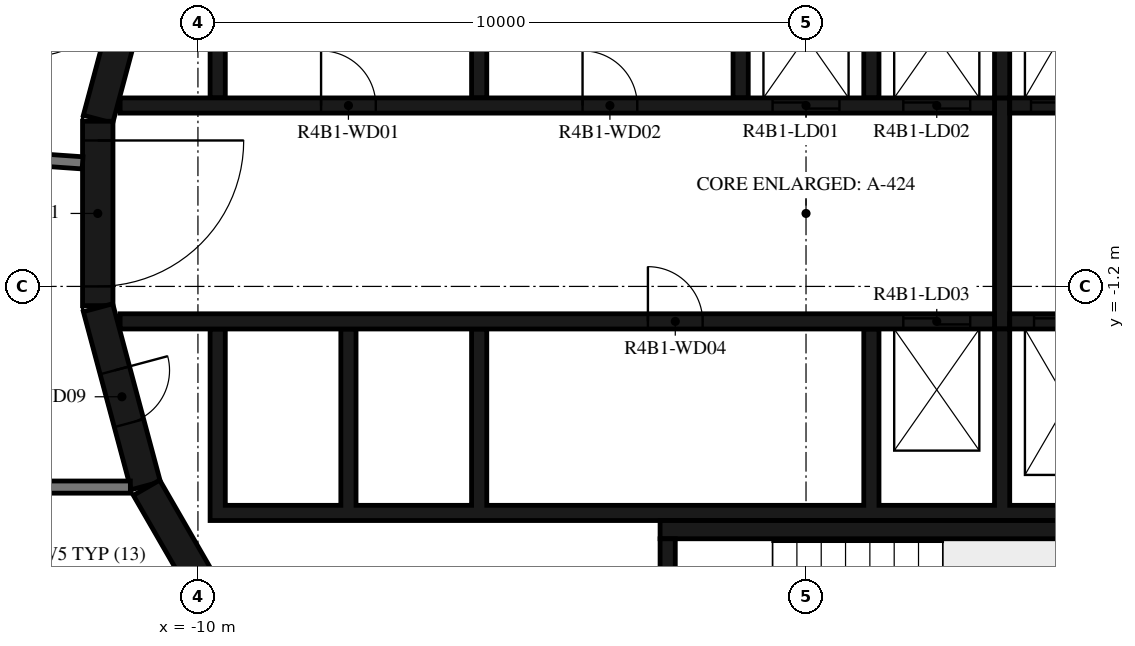
"""IFC4 building model, lengths in metres.
Left out: names, types, materials, properties, quantities, classifications, styles, units other than length and angle.
Written with IfcOpenShell. Run it as: python <this file> out.ifc"""

import sys

from ifc_helpers import new_model, si_unit, direction, frame, frame_2d, origin, place, context, subcontext, project, spatial, polyline, rectangle, outline, extrude, element, fill, save


model = new_model("IFC4")
c1 = context("Model", 3, precision=1e-05, world=origin(), true_north=direction((0.0, 1.0)))
c2 = subcontext(c1, "Body", "Model", "MODEL_VIEW")
j1 = project(units=[si_unit("LENGTHUNIT", "METRE"), si_unit("PLANEANGLEUNIT", "RADIAN")], contexts=[c1])
p1 = place(None, origin())
s1 = spatial("IfcSite", under=j1, at=p1, CompositionType="ELEMENT")
p2 = place(p1, origin())
s2 = spatial("IfcBuilding", under=s1, at=p2, CompositionType="ELEMENT")
p3 = place(p2, frame((0.0, 0.0, 162.2)))
s3 = spatial("IfcBuildingStorey", under=s2, at=p3, CompositionType="ELEMENT", Elevation=162.2)
p4 = place(p3, frame((-10.858, 4.479, 0.0), z_axis=(0.0, 0.0, 1.0), x_axis=(-0.258734743916, -0.965948410781, 0.0)))
e1 = element("IfcWall", 1, at=p4, inside=s3, PredefinedType="SHEAR", context=c2, shape_type="SweptSolid", body=[
    extrude(rectangle(XDim=3.033, YDim=0.5, at=frame_2d((1.516, 0.0))), origin(), (0.0, 0.0, 1.0), 3.12),
])
p5 = place(p3, frame((-11.647, 1.516, 0.0), z_axis=(0.0, 0.0, 1.0), x_axis=(0.0, -1.0, 0.0)))
e2 = element("IfcWall", 2, at=p5, inside=s3, PredefinedType="SHEAR", context=c2, shape_type="SweptSolid", body=[
    extrude(rectangle(XDim=3.033, YDim=0.5, at=frame_2d((1.516, 0.0))), origin(), (0.0, 0.0, 1.0), 3.12),
])
p6 = place(p5, frame((0.316, 0.0, 0.0)))
e3 = element("IfcOpeningElement", 3, at=p6, cuts=e2, PredefinedType="OPENING", context=c2, shape_type="SweptSolid", body=[
    extrude(rectangle(XDim=2.4, YDim=2.1, at=frame_2d((1.2, 1.05))), frame((0.0, 0.26, 0.0), z_axis=(0.0, -1.0, 0.0), x_axis=(1.0, 0.0, 0.0)), (0.0, 0.0, 1.0), 0.52),
])
p7 = place(p3, frame((-11.643, -1.55, 0.0), z_axis=(0.0, 0.0, 1.0), x_axis=(0.258734743916, -0.965948410781, 0.0)))
e4 = element("IfcWall", 4, at=p7, inside=s3, PredefinedType="SHEAR", context=c2, shape_type="SweptSolid", body=[
    extrude(rectangle(XDim=3.033, YDim=0.5, at=frame_2d((1.516, 0.0))), origin(), (0.0, 0.0, 1.0), 3.12),
])
p8 = place(p7, frame((1.066, 0.0, 0.0)))
e5 = element("IfcOpeningElement", 5, at=p8, cuts=e4, PredefinedType="OPENING", context=c2, shape_type="SweptSolid", body=[
    extrude(rectangle(XDim=0.9, YDim=2.1, at=frame_2d((0.45, 1.05))), frame((0.0, 0.26, 0.0), z_axis=(0.0, -1.0, 0.0), x_axis=(1.0, 0.0, 0.0)), (0.0, 0.0, 1.0), 0.52),
])
p9 = place(p3, frame((-10.845, -4.51, 0.0), z_axis=(0.0, 0.0, 1.0), x_axis=(0.500087131594, -0.865975092491, 0.0)))
e6 = element("IfcWall", 6, at=p9, inside=s3, PredefinedType="SHEAR", context=c2, shape_type="SweptSolid", body=[
    extrude(rectangle(XDim=3.033, YDim=0.5, at=frame_2d((1.516, 0.0))), origin(), (0.0, 0.0, 1.0), 3.12),
])
p10 = place(p3, frame((-2.275, -8.67, 0.0), z_axis=(0.0, 0.0, 1.0), x_axis=(0.0, 1.0, 0.0)))
e7 = element("IfcWall", 7, at=p10, inside=s3, PredefinedType="SHEAR", context=c2, shape_type="SweptSolid", body=[
    extrude(rectangle(XDim=3.32, YDim=0.25, at=frame_2d((1.66, 0.0))), origin(), (0.0, 0.0, 1.0), 3.12),
])
p11 = place(p3, frame((-2.4, -5.2, 0.0), z_axis=(0.0, 0.0, 1.0), x_axis=(1.0, 0.0, 0.0)))
e8 = element("IfcWall", 8, at=p11, inside=s3, PredefinedType="SHEAR", context=c2, shape_type="SweptSolid", body=[
    extrude(rectangle(XDim=7.05, YDim=0.3, at=frame_2d((3.525, 0.0))), origin(), (0.0, 0.0, 1.0), 3.12),
])
p12 = place(p3, origin())
e9 = element("IfcWall", 9, at=p12, inside=s3, PredefinedType="SHEAR", context=c2, shape_type="SweptSolid", body=[
    extrude(outline(polyline([(-9.55, 4.8), (-5.5, 4.8), (-5.5, 1.9), (-5.25, 1.9), (-5.25, 4.8), (-1.2, 4.8), (-1.2, 1.9), (-0.95, 1.9), (-0.95, 4.8), (0.95, 4.8), (0.95, 1.9), (1.2, 1.9), (1.2, 4.8), (3.1, 4.8), (3.1, 1.9), (3.35, 1.9), (3.35, 4.8), (5.25, 4.8), (5.25, 1.9), (5.5, 1.9), (5.5, 4.8), (7.4, 4.8), (7.4, 1.9), (7.65, 1.9), (7.65, 4.8), (9.55, 4.8), (9.55, 1.9), (9.8, 1.9), (9.8, 4.8), (9.8, 5.05), (-9.8, 5.05), (-9.8, 4.8), (-9.8, 1.9), (-9.55, 1.9), (-9.55, 4.8)])), origin(), (0.0, 0.0, 1.0), 3.12),
])
p13 = place(p3, origin())
e10 = element("IfcWall", 10, at=p13, inside=s3, PredefinedType="SHEAR", context=c2, shape_type="SweptSolid", body=[
    extrude(outline(polyline([(9.8, -5.05), (9.8, -4.8), (9.8, -1.9), (9.55, -1.9), (9.55, -4.8), (7.65, -4.8), (7.65, -1.9), (7.4, -1.9), (7.4, -4.8), (5.5, -4.8), (5.5, -1.9), (5.25, -1.9), (5.25, -4.8), (3.35, -4.8), (3.35, -1.9), (3.1, -1.9), (3.1, -4.8), (1.2, -4.8), (1.2, -1.9), (0.95, -1.9), (0.95, -4.8), (-5.25, -4.8), (-5.25, -1.9), (-5.5, -1.9), (-5.5, -4.8), (-7.4, -4.8), (-7.4, -1.9), (-7.65, -1.9), (-7.65, -4.8), (-9.55, -4.8), (-9.55, -1.9), (-9.8, -1.9), (-9.8, -4.8), (-9.8, -5.05), (9.8, -5.05)])), origin(), (0.0, 0.0, 1.0), 3.12),
])
p14 = place(p3, frame((-11.28, 1.775, 0.0), z_axis=(0.0, 0.0, 1.0), x_axis=(1.0, 0.0, 0.0)))
e11 = element("IfcWall", 11, at=p14, inside=s3, PredefinedType="SHEAR", context=c2, shape_type="SweptSolid", body=[
    extrude(rectangle(XDim=14.38, YDim=0.25, at=frame_2d((7.19, 0.0))), origin(), (0.0, 0.0, 1.0), 3.12),
])
p15 = place(p14, frame((10.73, 0.0, 0.0)))
e12 = element("IfcOpeningElement", 12, at=p15, cuts=e11, PredefinedType="OPENING", context=c2, shape_type="SweptSolid", body=[
    extrude(rectangle(XDim=1.1, YDim=2.1, at=frame_2d((0.55, 1.05))), frame((0.0, 0.135, 0.0), z_axis=(0.0, -1.0, 0.0), x_axis=(1.0, 0.0, 0.0)), (0.0, 0.0, 1.0), 0.27),
])
p16 = place(p14, frame((12.88, 0.0, 0.0)))
e13 = element("IfcOpeningElement", 13, at=p16, cuts=e11, PredefinedType="OPENING", context=c2, shape_type="SweptSolid", body=[
    extrude(rectangle(XDim=1.1, YDim=2.1, at=frame_2d((0.55, 1.05))), frame((0.0, 0.135, 0.0), z_axis=(0.0, -1.0, 0.0), x_axis=(1.0, 0.0, 0.0)), (0.0, 0.0, 1.0), 0.27),
])
p17 = place(p14, frame((3.305, 0.0, 0.0)))
e14 = element("IfcOpeningElement", 14, at=p17, cuts=e11, PredefinedType="OPENING", context=c2, shape_type="SweptSolid", body=[
    extrude(rectangle(XDim=0.9, YDim=2.1, at=frame_2d((0.45, 1.05))), frame((0.0, 0.135, 0.0), z_axis=(0.0, -1.0, 0.0), x_axis=(1.0, 0.0, 0.0)), (0.0, 0.0, 1.0), 0.27),
])
p18 = place(p14, frame((7.605, 0.0, 0.0)))
e15 = element("IfcOpeningElement", 15, at=p18, cuts=e11, PredefinedType="OPENING", context=c2, shape_type="SweptSolid", body=[
    extrude(rectangle(XDim=0.9, YDim=2.1, at=frame_2d((0.45, 1.05))), frame((0.0, 0.135, 0.0), z_axis=(0.0, -1.0, 0.0), x_axis=(1.0, 0.0, 0.0)), (0.0, 0.0, 1.0), 0.27),
])
p19 = place(p3, frame((3.35, 1.775, 0.0), z_axis=(0.0, 0.0, 1.0), x_axis=(1.0, 0.0, 0.0)))
e16 = element("IfcWall", 16, at=p19, inside=s3, PredefinedType="SHEAR", context=c2, shape_type="SweptSolid", body=[
    extrude(rectangle(XDim=7.93, YDim=0.25, at=frame_2d((3.965, 0.0))), origin(), (0.0, 0.0, 1.0), 3.12),
])
p20 = place(p19, frame((0.35, 0.0, 0.0)))
e17 = element("IfcOpeningElement", 17, at=p20, cuts=e16, PredefinedType="OPENING", context=c2, shape_type="SweptSolid", body=[
    extrude(rectangle(XDim=1.2, YDim=2.4, at=frame_2d((0.6, 1.2))), frame((0.0, 0.135, 0.0), z_axis=(0.0, -1.0, 0.0), x_axis=(1.0, 0.0, 0.0)), (0.0, 0.0, 1.0), 0.27),
])
p21 = place(p19, frame((2.5, 0.0, 0.0)))
e18 = element("IfcOpeningElement", 18, at=p21, cuts=e16, PredefinedType="OPENING", context=c2, shape_type="SweptSolid", body=[
    extrude(rectangle(XDim=1.2, YDim=2.4, at=frame_2d((0.6, 1.2))), frame((0.0, 0.135, 0.0), z_axis=(0.0, -1.0, 0.0), x_axis=(1.0, 0.0, 0.0)), (0.0, 0.0, 1.0), 0.27),
])
p22 = place(p19, frame((4.8, 0.0, 0.0)))
e19 = element("IfcOpeningElement", 19, at=p22, cuts=e16, PredefinedType="OPENING", context=c2, shape_type="SweptSolid", body=[
    extrude(rectangle(XDim=0.9, YDim=2.1, at=frame_2d((0.45, 1.05))), frame((0.0, 0.135, 0.0), z_axis=(0.0, -1.0, 0.0), x_axis=(1.0, 0.0, 0.0)), (0.0, 0.0, 1.0), 0.27),
])
p23 = place(p3, frame((-11.28, -1.775, 0.0), z_axis=(0.0, 0.0, 1.0), x_axis=(1.0, 0.0, 0.0)))
e20 = element("IfcWall", 20, at=p23, inside=s3, PredefinedType="SHEAR", context=c2, shape_type="SweptSolid", body=[
    extrude(rectangle(XDim=14.38, YDim=0.25, at=frame_2d((7.19, 0.0))), origin(), (0.0, 0.0, 1.0), 3.12),
])
p24 = place(p23, frame((12.88, 0.0, 0.0)))
e21 = element("IfcOpeningElement", 21, at=p24, cuts=e20, PredefinedType="OPENING", context=c2, shape_type="SweptSolid", body=[
    extrude(rectangle(XDim=1.1, YDim=2.1, at=frame_2d((0.55, 1.05))), frame((0.0, 0.135, 0.0), z_axis=(0.0, -1.0, 0.0), x_axis=(1.0, 0.0, 0.0)), (0.0, 0.0, 1.0), 0.27),
])
p25 = place(p23, frame((8.68, 0.0, 0.0)))
e22 = element("IfcOpeningElement", 22, at=p25, cuts=e20, PredefinedType="OPENING", context=c2, shape_type="SweptSolid", body=[
    extrude(rectangle(XDim=0.9, YDim=2.1, at=frame_2d((0.45, 1.05))), frame((0.0, 0.135, 0.0), z_axis=(0.0, -1.0, 0.0), x_axis=(1.0, 0.0, 0.0)), (0.0, 0.0, 1.0), 0.27),
])
p26 = place(p3, frame((3.35, -1.775, 0.0), z_axis=(0.0, 0.0, 1.0), x_axis=(1.0, 0.0, 0.0)))
e23 = element("IfcWall", 23, at=p26, inside=s3, PredefinedType="SHEAR", context=c2, shape_type="SweptSolid", body=[
    extrude(rectangle(XDim=7.93, YDim=0.25, at=frame_2d((3.965, 0.0))), origin(), (0.0, 0.0, 1.0), 3.12),
])
p27 = place(p26, frame((0.4, 0.0, 0.0)))
e24 = element("IfcOpeningElement", 24, at=p27, cuts=e23, PredefinedType="OPENING", context=c2, shape_type="SweptSolid", body=[
    extrude(rectangle(XDim=1.1, YDim=2.4, at=frame_2d((0.55, 1.2))), frame((0.0, 0.135, 0.0), z_axis=(0.0, -1.0, 0.0), x_axis=(1.0, 0.0, 0.0)), (0.0, 0.0, 1.0), 0.27),
])
p28 = place(p26, frame((2.55, 0.0, 0.0)))
e25 = element("IfcOpeningElement", 25, at=p28, cuts=e23, PredefinedType="OPENING", context=c2, shape_type="SweptSolid", body=[
    extrude(rectangle(XDim=1.1, YDim=2.4, at=frame_2d((0.55, 1.2))), frame((0.0, 0.135, 0.0), z_axis=(0.0, -1.0, 0.0), x_axis=(1.0, 0.0, 0.0)), (0.0, 0.0, 1.0), 0.27),
])
p29 = place(p26, frame((4.7, 0.0, 0.0)))
e26 = element("IfcOpeningElement", 26, at=p29, cuts=e23, PredefinedType="OPENING", context=c2, shape_type="SweptSolid", body=[
    extrude(rectangle(XDim=1.1, YDim=2.4, at=frame_2d((0.55, 1.2))), frame((0.0, 0.135, 0.0), z_axis=(0.0, -1.0, 0.0), x_axis=(1.0, 0.0, 0.0)), (0.0, 0.0, 1.0), 0.27),
])
p30 = place(p3, frame((3.225, -1.9, 0.0), z_axis=(0.0, 0.0, 1.0), x_axis=(0.0, 1.0, 0.0)))
e27 = element("IfcWall", 27, at=p30, inside=s3, PredefinedType="SHEAR", context=c2, shape_type="SweptSolid", body=[
    extrude(rectangle(XDim=3.8, YDim=0.25, at=frame_2d((1.9, 0.0))), origin(), (0.0, 0.0, 1.0), 3.12),
])
p31 = place(p3, frame((-13.454, 0.941, 0.0), z_axis=(0.0, 0.0, 1.0), x_axis=(0.99755155062, -0.069934997354, 0.0)))
e28 = element("IfcWall", 28, at=p31, inside=s3, PredefinedType="STANDARD", context=c2, shape_type="SweptSolid", body=[
    extrude(rectangle(XDim=1.561, YDim=0.2, at=frame_2d((0.78, 0.0))), origin(), (0.0, 0.0, 1.0), 3.12),
])
p32 = place(p3, frame((-14.213, -4.5, 0.0), z_axis=(0.0, 0.0, 1.0), x_axis=(1.0, 0.0, 0.0)))
e29 = element("IfcWall", 29, at=p32, inside=s3, PredefinedType="STANDARD", context=c2, shape_type="SweptSolid", body=[
    extrude(rectangle(XDim=3.102, YDim=0.2, at=frame_2d((1.551, 0.0))), origin(), (0.0, 0.0, 1.0), 3.12),
])
p33 = place(p6, origin())
e30 = element("IfcDoor", 30, at=p33, inside=s3, OperationType="DOUBLE_DOOR_SINGLE_SWING", PredefinedType="DOOR", context=c2, shape_type="SweptSolid", body=[
    extrude(rectangle(XDim=2.4, YDim=2.1, at=frame_2d((1.2, 1.05))), frame((0.0, 0.025, 0.0), z_axis=(0.0, -1.0, 0.0), x_axis=(1.0, 0.0, 0.0)), (0.0, 0.0, 1.0), 0.05),
])
fill(e3, e30)
p34 = place(p15, origin())
e31 = element("IfcDoor", 31, at=p34, inside=s3, OperationType="DOUBLE_DOOR_SLIDING", PredefinedType="DOOR", context=c2, shape_type="SweptSolid", body=[
    extrude(rectangle(XDim=1.1, YDim=2.1, at=frame_2d((0.55, 1.05))), frame((0.0, 0.025, 0.0), z_axis=(0.0, -1.0, 0.0), x_axis=(1.0, 0.0, 0.0)), (0.0, 0.0, 1.0), 0.05),
])
fill(e12, e31)
p35 = place(p16, origin())
e32 = element("IfcDoor", 32, at=p35, inside=s3, OperationType="DOUBLE_DOOR_SLIDING", PredefinedType="DOOR", context=c2, shape_type="SweptSolid", body=[
    extrude(rectangle(XDim=1.1, YDim=2.1, at=frame_2d((0.55, 1.05))), frame((0.0, 0.025, 0.0), z_axis=(0.0, -1.0, 0.0), x_axis=(1.0, 0.0, 0.0)), (0.0, 0.0, 1.0), 0.05),
])
fill(e13, e32)
p36 = place(p20, origin())
e33 = element("IfcDoor", 33, at=p36, inside=s3, OperationType="DOUBLE_DOOR_SLIDING", PredefinedType="DOOR", context=c2, shape_type="SweptSolid", body=[
    extrude(rectangle(XDim=1.2, YDim=2.4, at=frame_2d((0.6, 1.2))), frame((0.0, 0.025, 0.0), z_axis=(0.0, -1.0, 0.0), x_axis=(1.0, 0.0, 0.0)), (0.0, 0.0, 1.0), 0.05),
])
fill(e17, e33)
p37 = place(p24, origin())
e34 = element("IfcDoor", 34, at=p37, inside=s3, OperationType="DOUBLE_DOOR_SLIDING", PredefinedType="DOOR", context=c2, shape_type="SweptSolid", body=[
    extrude(rectangle(XDim=1.1, YDim=2.1, at=frame_2d((0.55, 1.05))), frame((0.0, 0.025, 0.0), z_axis=(0.0, -1.0, 0.0), x_axis=(1.0, 0.0, 0.0)), (0.0, 0.0, 1.0), 0.05),
])
fill(e21, e34)
p38 = place(p27, origin())
e35 = element("IfcDoor", 35, at=p38, inside=s3, OperationType="DOUBLE_DOOR_SLIDING", PredefinedType="DOOR", context=c2, shape_type="SweptSolid", body=[
    extrude(rectangle(XDim=1.1, YDim=2.4, at=frame_2d((0.55, 1.2))), frame((0.0, 0.025, 0.0), z_axis=(0.0, -1.0, 0.0), x_axis=(1.0, 0.0, 0.0)), (0.0, 0.0, 1.0), 0.05),
])
fill(e24, e35)
p39 = place(p17, origin())
e36 = element("IfcDoor", 36, at=p39, inside=s3, OperationType="SINGLE_SWING_LEFT", PredefinedType="DOOR", context=c2, shape_type="SweptSolid", body=[
    extrude(rectangle(XDim=0.9, YDim=2.1, at=frame_2d((0.45, 1.05))), frame((0.0, 0.025, 0.0), z_axis=(0.0, -1.0, 0.0), x_axis=(1.0, 0.0, 0.0)), (0.0, 0.0, 1.0), 0.05),
])
fill(e14, e36)
p40 = place(p18, origin())
e37 = element("IfcDoor", 37, at=p40, inside=s3, OperationType="SINGLE_SWING_RIGHT", PredefinedType="DOOR", context=c2, shape_type="SweptSolid", body=[
    extrude(rectangle(XDim=0.9, YDim=2.1, at=frame_2d((0.45, 1.05))), frame((0.0, 0.025, 0.0), z_axis=(0.0, -1.0, 0.0), x_axis=(1.0, 0.0, 0.0)), (0.0, 0.0, 1.0), 0.05),
])
fill(e15, e37)
p41 = place(p25, origin())
e38 = element("IfcDoor", 38, at=p41, inside=s3, OperationType="SINGLE_SWING_RIGHT", PredefinedType="DOOR", context=c2, shape_type="SweptSolid", body=[
    extrude(rectangle(XDim=0.9, YDim=2.1, at=frame_2d((0.45, 1.05))), frame((0.0, 0.025, 0.0), z_axis=(0.0, -1.0, 0.0), x_axis=(1.0, 0.0, 0.0)), (0.0, 0.0, 1.0), 0.05),
])
fill(e22, e38)
p42 = place(p8, origin())
e39 = element("IfcDoor", 39, at=p42, inside=s3, OperationType="SINGLE_SWING_LEFT", PredefinedType="DOOR", context=c2, shape_type="SweptSolid", body=[
    extrude(rectangle(XDim=0.9, YDim=2.1, at=frame_2d((0.45, 1.05))), frame((0.0, 0.025, 0.0), z_axis=(0.0, -1.0, 0.0), x_axis=(1.0, 0.0, 0.0)), (0.0, 0.0, 1.0), 0.05),
])
fill(e5, e39)
save(model, sys.argv[1])
